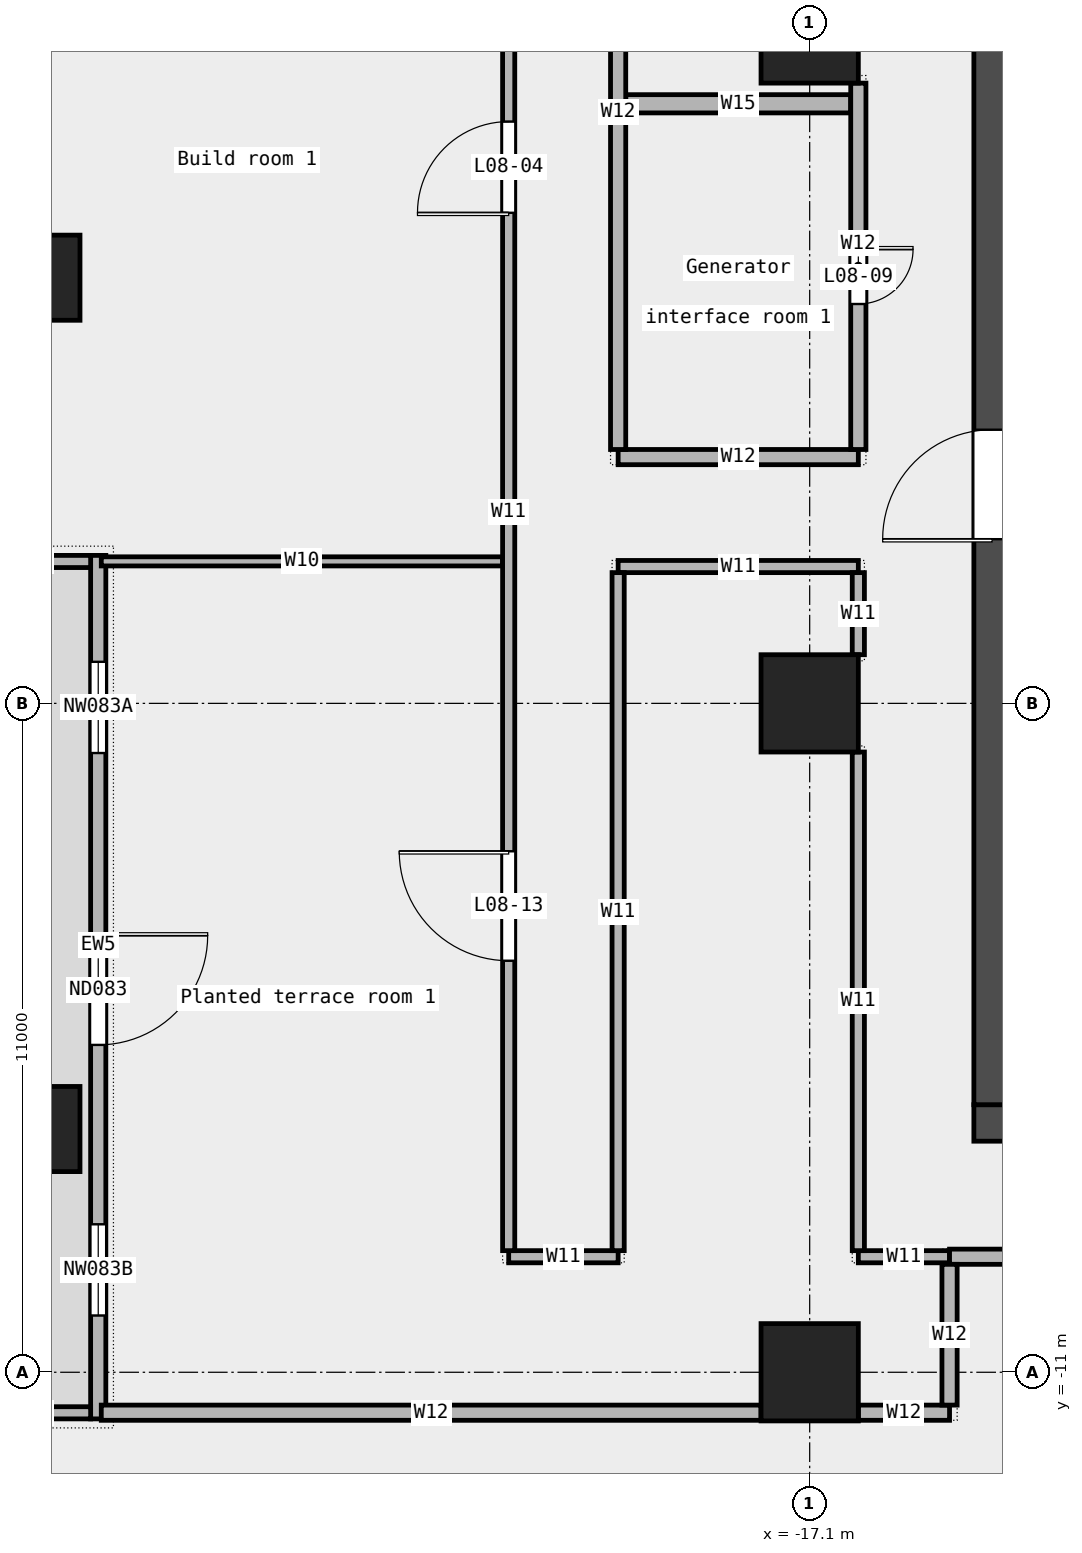
"""IFC4 building model, lengths in metres.
Left out: names, types, materials, properties, quantities, classifications, styles, units other than length and angle.
Written with IfcOpenShell. Run it as: python <this file> out.ifc"""

import sys

from ifc_helpers import new_model, si_unit, direction, frame, frame_2d, origin, origin_2d, place, context, subcontext, project, spatial, rectangle, extrude, element, fill, save


model = new_model("IFC4")
c1 = context("Model", 3, precision=1e-05, world=origin(), true_north=direction((0.0, 1.0)))
c2 = subcontext(c1, "Body", "Model", "MODEL_VIEW")
j1 = project(units=[si_unit("LENGTHUNIT", "METRE"), si_unit("PLANEANGLEUNIT", "RADIAN")], contexts=[c1])
p1 = place(None, origin())
s1 = spatial("IfcSite", under=j1, at=p1, CompositionType="ELEMENT")
p2 = place(p1, origin())
s2 = spatial("IfcBuilding", under=s1, at=p2, CompositionType="ELEMENT")
p3 = place(p2, frame((0.0, 0.0, 45.4)))
s3 = spatial("IfcBuildingStorey", under=s2, at=p3, CompositionType="ELEMENT", Elevation=45.4)
for number, where, z_axis, x_axis in (
    (1, (-29.8, 7.0, 0.0), (0.0, 0.0, 1.0), (1.0, 0.0, 0.0)),
    (2, (-29.8, -7.0, 0.0), (0.0, 0.0, 1.0), (1.0, 0.0, 0.0)),
):
    element("IfcColumn", number, at=place(p3, frame(where, z_axis=z_axis, x_axis=x_axis)), inside=s3, PredefinedType="COLUMN", context=c2, shape_type="SweptSolid", body=[
        extrude(rectangle(XDim=1.4, YDim=1.4, at=origin_2d()), origin(), (0.0, 0.0, 1.0), 4.35),
    ])
for number, where, z_axis, x_axis in (
    (3, (-17.1, -11.0, 0.0), (0.0, 0.0, 1.0), (1.0, 0.0, 0.0)),
    (4, (-17.1, 0.0, 0.0), (0.0, 0.0, 1.0), (1.0, 0.0, 0.0)),
    (5, (-17.1, 11.0, 0.0), (0.0, 0.0, 1.0), (1.0, 0.0, 0.0)),
):
    element("IfcColumn", number, at=place(p3, frame(where, z_axis=z_axis, x_axis=x_axis)), inside=s3, PredefinedType="COLUMN", context=c2, shape_type="SweptSolid", body=[
        extrude(rectangle(XDim=1.6, YDim=1.6, at=origin_2d()), origin(), (0.0, 0.0, 1.0), 4.35),
    ])
p4 = place(p3, frame((-28.8, 2.433, 0.0), z_axis=(0.0, 0.0, 1.0), x_axis=(0.0, -1.0, 0.0)))
e6 = element("IfcWall", 6, at=p4, inside=s3, PredefinedType="STANDARD", context=c2, shape_type="SweptSolid", body=[
    extrude(rectangle(XDim=14.2, YDim=0.25, at=frame_2d((7.1, 0.0))), origin(), (0.0, 0.0, 1.0), 4.35),
])
p5 = place(p4, frame((1.75, 0.0, 0.45)))
e7 = element("IfcOpeningElement", 7, at=p5, cuts=e6, PredefinedType="OPENING", context=c2, shape_type="SweptSolid", body=[
    extrude(rectangle(XDim=1.5, YDim=3.0, at=frame_2d((0.75, 1.5))), frame((0.0, 0.137, 0.0), z_axis=(0.0, -1.0, 0.0), x_axis=(1.0, 0.0, 0.0)), (0.0, 0.0, 1.0), 0.274),
])
p6 = place(p4, frame((6.25, 0.0, 0.0)))
e8 = element("IfcOpeningElement", 8, at=p6, cuts=e6, PredefinedType="OPENING", context=c2, shape_type="SweptSolid", body=[
    extrude(rectangle(XDim=1.8, YDim=2.4, at=frame_2d((0.9, 1.2))), frame((0.0, 0.137, 0.0), z_axis=(0.0, -1.0, 0.0), x_axis=(1.0, 0.0, 0.0)), (0.0, 0.0, 1.0), 0.274),
])
p7 = place(p4, frame((11.0, 0.0, 0.45)))
e9 = element("IfcOpeningElement", 9, at=p7, cuts=e6, PredefinedType="OPENING", context=c2, shape_type="SweptSolid", body=[
    extrude(rectangle(XDim=1.5, YDim=3.0, at=frame_2d((0.75, 1.5))), frame((0.0, 0.137, 0.0), z_axis=(0.0, -1.0, 0.0), x_axis=(1.0, 0.0, 0.0)), (0.0, 0.0, 1.0), 0.274),
])
for number, where, z_axis, x_axis in (
    (10, (-30.8, 2.333, 0.0), (0.0, 0.0, 1.0), (1.0, 0.0, 0.0)),
    (11, (-30.8, -11.667, 0.0), (0.0, 0.0, 1.0), (1.0, 0.0, 0.0)),
):
    element("IfcWall", number, at=place(p3, frame(where, z_axis=z_axis, x_axis=x_axis)), inside=s3, PredefinedType="STANDARD", context=c2, shape_type="SweptSolid", body=[
        extrude(rectangle(XDim=1.875, YDim=0.2, at=frame_2d((0.938, 0.0))), origin(), (0.0, 0.0, 1.0), 4.35),
    ])
p8 = place(p3, frame((-28.75, -11.665, 0.0), z_axis=(0.0, 0.0, 1.0), x_axis=(1.0, 0.0, 0.0)))
e12 = element("IfcWall", 12, at=p8, inside=s3, PredefinedType="PARTITIONING", context=c2, shape_type="SweptSolid", body=[
    extrude(rectangle(XDim=10.85, YDim=0.25, at=frame_2d((5.425, 0.0))), origin(), (0.0, 0.0, 1.0), 4.35),
])
p9 = place(p3, frame((-16.3, -11.665, 0.0), z_axis=(0.0, 0.0, 1.0), x_axis=(1.0, 0.0, 0.0)))
e13 = element("IfcWall", 13, at=p9, inside=s3, PredefinedType="PARTITIONING", context=c2, shape_type="SweptSolid", body=[
    extrude(rectangle(XDim=1.5, YDim=0.25, at=frame_2d((0.75, 0.0))), origin(), (0.0, 0.0, 1.0), 4.35),
])
p10 = place(p3, frame((-22.05, -9.1, 0.0), z_axis=(0.0, 0.0, 1.0), x_axis=(1.0, 0.0, 0.0)))
e14 = element("IfcWall", 14, at=p10, inside=s3, PredefinedType="PARTITIONING", context=c2, shape_type="SweptSolid", body=[
    extrude(rectangle(XDim=1.8, YDim=0.2, at=frame_2d((0.9, 0.0))), origin(), (0.0, 0.0, 1.0), 4.35),
])
p11 = place(p3, frame((-16.3, -9.1, 0.0), z_axis=(0.0, 0.0, 1.0), x_axis=(1.0, 0.0, 0.0)))
e15 = element("IfcWall", 15, at=p11, inside=s3, PredefinedType="PARTITIONING", context=c2, shape_type="SweptSolid", body=[
    extrude(rectangle(XDim=1.5, YDim=0.2, at=frame_2d((0.75, 0.0))), origin(), (0.0, 0.0, 1.0), 4.35),
])
p12 = place(p3, frame((-14.8, -9.1, 0.0), z_axis=(0.0, 0.0, 1.0), x_axis=(1.0, 0.0, 0.0)))
e16 = element("IfcWall", 16, at=p12, inside=s3, PredefinedType="PARTITIONING", context=c2, shape_type="SweptSolid", body=[
    extrude(rectangle(XDim=29.6, YDim=0.25, at=frame_2d((14.8, 0.0))), origin(), (0.0, 0.0, 1.0), 4.35),
])
p13 = place(p12, frame((4.802, 0.0, 0.0)))
e17 = element("IfcOpeningElement", 17, at=p13, cuts=e16, PredefinedType="OPENING", context=c2, shape_type="SweptSolid", body=[
    extrude(rectangle(XDim=1.8, YDim=2.1, at=frame_2d((0.9, 1.05))), frame((0.0, 0.137, 0.0), z_axis=(0.0, -1.0, 0.0), x_axis=(1.0, 0.0, 0.0)), (0.0, 0.0, 1.0), 0.274),
])
p14 = place(p12, frame((21.403, 0.0, 0.0)))
e18 = element("IfcOpeningElement", 18, at=p14, cuts=e16, PredefinedType="OPENING", context=c2, shape_type="SweptSolid", body=[
    extrude(rectangle(XDim=1.8, YDim=2.1, at=frame_2d((0.9, 1.05))), frame((0.0, 0.137, 0.0), z_axis=(0.0, -1.0, 0.0), x_axis=(1.0, 0.0, 0.0)), (0.0, 0.0, 1.0), 0.274),
])
p15 = place(p3, frame((-20.25, 2.25, 0.0), z_axis=(0.0, 0.0, 1.0), x_axis=(1.0, 0.0, 0.0)))
e19 = element("IfcWall", 19, at=p15, inside=s3, PredefinedType="PARTITIONING", context=c2, shape_type="SweptSolid", body=[
    extrude(rectangle(XDim=3.95, YDim=0.2, at=frame_2d((1.975, 0.0))), origin(), (0.0, 0.0, 1.0), 4.35),
])
p16 = place(p3, frame((-28.75, 2.335, 0.0), z_axis=(0.0, 0.0, 1.0), x_axis=(1.0, 0.0, 0.0)))
e20 = element("IfcWall", 20, at=p16, inside=s3, PredefinedType="PARTITIONING", context=c2, shape_type="SweptSolid", body=[
    extrude(rectangle(XDim=6.6, YDim=0.15, at=frame_2d((3.3, 0.0))), origin(), (0.0, 0.0, 1.0), 4.35),
])
p17 = place(p3, frame((-20.25, 4.05, 0.0), z_axis=(0.0, 0.0, 1.0), x_axis=(1.0, 0.0, 0.0)))
e21 = element("IfcWall", 21, at=p17, inside=s3, PredefinedType="PARTITIONING", context=c2, shape_type="SweptSolid", body=[
    extrude(rectangle(XDim=3.95, YDim=0.25, at=frame_2d((1.975, 0.0))), origin(), (0.0, 0.0, 1.0), 4.35),
])
p18 = place(p3, frame((-20.125, 9.86, 0.0), z_axis=(0.0, 0.0, 1.0), x_axis=(1.0, 0.0, 0.0)))
e22 = element("IfcWall", 22, at=p18, inside=s3, PredefinedType="PARTITIONING", context=c2, shape_type="SweptSolid", body=[
    extrude(rectangle(XDim=3.7, YDim=0.3, at=frame_2d((1.85, 0.0))), origin(), (0.0, 0.0, 1.0), 4.35),
])
p19 = place(p3, frame((-22.05, -9.0, 0.0), z_axis=(0.0, 0.0, 1.0), x_axis=(0.0, 1.0, 0.0)))
e23 = element("IfcWall", 23, at=p19, inside=s3, PredefinedType="PARTITIONING", context=c2, shape_type="SweptSolid", body=[
    extrude(rectangle(XDim=24.3, YDim=0.2, at=frame_2d((12.15, 0.0))), origin(), (0.0, 0.0, 1.0), 4.35),
])
p20 = place(p19, frame((17.067, 0.0, 0.0)))
e24 = element("IfcOpeningElement", 24, at=p20, cuts=e23, PredefinedType="OPENING", context=c2, shape_type="SweptSolid", body=[
    extrude(rectangle(XDim=1.5, YDim=2.1, at=frame_2d((0.75, 1.05))), frame((0.0, 0.112, 0.0), z_axis=(0.0, -1.0, 0.0), x_axis=(1.0, 0.0, 0.0)), (0.0, 0.0, 1.0), 0.224),
])
p21 = place(p19, frame((4.768, 0.0, 0.0)))
e25 = element("IfcOpeningElement", 25, at=p21, cuts=e23, PredefinedType="OPENING", context=c2, shape_type="SweptSolid", body=[
    extrude(rectangle(XDim=1.8, YDim=2.1, at=frame_2d((0.9, 1.05))), frame((0.0, 0.112, 0.0), z_axis=(0.0, -1.0, 0.0), x_axis=(1.0, 0.0, 0.0)), (0.0, 0.0, 1.0), 0.224),
])
p22 = place(p3, frame((-20.25, -9.0, 0.0), z_axis=(0.0, 0.0, 1.0), x_axis=(0.0, 1.0, 0.0)))
e26 = element("IfcWall", 26, at=p22, inside=s3, PredefinedType="PARTITIONING", context=c2, shape_type="SweptSolid", body=[
    extrude(rectangle(XDim=11.15, YDim=0.2, at=frame_2d((5.575, 0.0))), origin(), (0.0, 0.0, 1.0), 4.35),
])
p23 = place(p3, frame((-20.25, 4.175, 0.0), z_axis=(0.0, 0.0, 1.0), x_axis=(0.0, 1.0, 0.0)))
e27 = element("IfcWall", 27, at=p23, inside=s3, PredefinedType="PARTITIONING", context=c2, shape_type="SweptSolid", body=[
    extrude(rectangle(XDim=11.1, YDim=0.25, at=frame_2d((5.55, 0.0))), origin(), (0.0, 0.0, 1.0), 4.35),
])
p24 = place(p3, frame((-16.3, -9.0, 0.0), z_axis=(0.0, 0.0, 1.0), x_axis=(0.0, 1.0, 0.0)))
e28 = element("IfcWall", 28, at=p24, inside=s3, PredefinedType="PARTITIONING", context=c2, shape_type="SweptSolid", body=[
    extrude(rectangle(XDim=8.2, YDim=0.2, at=frame_2d((4.1, 0.0))), origin(), (0.0, 0.0, 1.0), 4.35),
])
p25 = place(p3, frame((-16.3, 0.8, 0.0), z_axis=(0.0, 0.0, 1.0), x_axis=(0.0, 1.0, 0.0)))
e29 = element("IfcWall", 29, at=p25, inside=s3, PredefinedType="PARTITIONING", context=c2, shape_type="SweptSolid", body=[
    extrude(rectangle(XDim=1.35, YDim=0.2, at=frame_2d((0.675, 0.0))), origin(), (0.0, 0.0, 1.0), 4.35),
])
p26 = place(p3, frame((-16.3, 4.175, 0.0), z_axis=(0.0, 0.0, 1.0), x_axis=(0.0, 1.0, 0.0)))
e30 = element("IfcWall", 30, at=p26, inside=s3, PredefinedType="PARTITIONING", context=c2, shape_type="SweptSolid", body=[
    extrude(rectangle(XDim=6.025, YDim=0.25, at=frame_2d((3.012, 0.0))), origin(), (0.0, 0.0, 1.0), 4.35),
])
p27 = place(p26, frame((2.393, 0.0, 0.0)))
e31 = element("IfcOpeningElement", 31, at=p27, cuts=e30, PredefinedType="OPENING", context=c2, shape_type="SweptSolid", body=[
    extrude(rectangle(XDim=0.9, YDim=2.1, at=frame_2d((0.45, 1.05))), frame((0.0, 0.137, 0.0), z_axis=(0.0, -1.0, 0.0), x_axis=(1.0, 0.0, 0.0)), (0.0, 0.0, 1.0), 0.274),
])
p28 = place(p3, frame((-14.8, -11.54, 0.0), z_axis=(0.0, 0.0, 1.0), x_axis=(0.0, 1.0, 0.0)))
e32 = element("IfcWall", 32, at=p28, inside=s3, PredefinedType="PARTITIONING", context=c2, shape_type="SweptSolid", body=[
    extrude(rectangle(XDim=2.315, YDim=0.25, at=frame_2d((1.157, 0.0))), origin(), (0.0, 0.0, 1.0), 4.35),
])
p29 = place(p3, frame((-14.4, -6.9, 0.0), z_axis=(0.0, 0.0, 1.0), x_axis=(1.0, 0.0, 0.0)))
e33 = element("IfcWall", 33, at=p29, inside=s3, PredefinedType="SHEAR", context=c2, shape_type="SweptSolid", body=[
    extrude(rectangle(XDim=28.8, YDim=0.6, at=frame_2d((14.4, 0.0))), origin(), (0.0, 0.0, 1.0), 4.5),
])
p30 = place(p29, frame((4.9, 0.0, 0.0)))
e34 = element("IfcOpeningElement", 34, at=p30, cuts=e33, PredefinedType="OPENING", context=c2, shape_type="SweptSolid", body=[
    extrude(rectangle(XDim=1.0, YDim=2.1, at=frame_2d((0.5, 1.05))), frame((0.0, 0.312, 0.0), z_axis=(0.0, -1.0, 0.0), x_axis=(1.0, 0.0, 0.0)), (0.0, 0.0, 1.0), 0.624),
])
p31 = place(p29, frame((8.462, 0.0, 0.0)))
e35 = element("IfcOpeningElement", 35, at=p31, cuts=e33, PredefinedType="OPENING", context=c2, shape_type="SweptSolid", body=[
    extrude(rectangle(XDim=1.0, YDim=2.1, at=frame_2d((0.5, 1.05))), frame((0.0, 0.312, 0.0), z_axis=(0.0, -1.0, 0.0), x_axis=(1.0, 0.0, 0.0)), (0.0, 0.0, 1.0), 0.624),
])
p32 = place(p29, frame((13.425, 0.0, 0.0)))
e36 = element("IfcOpeningElement", 36, at=p32, cuts=e33, PredefinedType="OPENING", context=c2, shape_type="SweptSolid", body=[
    extrude(rectangle(XDim=1.2, YDim=2.1, at=frame_2d((0.6, 1.05))), frame((0.0, 0.312, 0.0), z_axis=(0.0, -1.0, 0.0), x_axis=(1.0, 0.0, 0.0)), (0.0, 0.0, 1.0), 0.624),
])
p33 = place(p29, frame((18.75, 0.0, 0.0)))
e37 = element("IfcOpeningElement", 37, at=p33, cuts=e33, PredefinedType="OPENING", context=c2, shape_type="SweptSolid", body=[
    extrude(rectangle(XDim=1.8, YDim=2.1, at=frame_2d((0.9, 1.05))), frame((0.0, 0.312, 0.0), z_axis=(0.0, -1.0, 0.0), x_axis=(1.0, 0.0, 0.0)), (0.0, 0.0, 1.0), 0.624),
])
p34 = place(p29, frame((23.087, 0.0, 0.0)))
e38 = element("IfcOpeningElement", 38, at=p34, cuts=e33, PredefinedType="OPENING", context=c2, shape_type="SweptSolid", body=[
    extrude(rectangle(XDim=1.0, YDim=2.1, at=frame_2d((0.5, 1.05))), frame((0.0, 0.312, 0.0), z_axis=(0.0, -1.0, 0.0), x_axis=(1.0, 0.0, 0.0)), (0.0, 0.0, 1.0), 0.624),
])
p35 = place(p3, frame((-14.1, -6.6, 0.0), z_axis=(0.0, 0.0, 1.0), x_axis=(0.0, 1.0, 0.0)))
e39 = element("IfcWall", 39, at=p35, inside=s3, PredefinedType="SHEAR", context=c2, shape_type="SweptSolid", body=[
    extrude(rectangle(XDim=19.5, YDim=0.6, at=frame_2d((9.75, 0.0))), origin(), (0.0, 0.0, 1.0), 4.5),
])
p36 = place(p35, frame((9.3, 0.0, 0.0)))
e40 = element("IfcOpeningElement", 40, at=p36, cuts=e39, PredefinedType="OPENING", context=c2, shape_type="SweptSolid", body=[
    extrude(rectangle(XDim=1.8, YDim=2.1, at=frame_2d((0.9, 1.05))), frame((0.0, 0.312, 0.0), z_axis=(0.0, -1.0, 0.0), x_axis=(1.0, 0.0, 0.0)), (0.0, 0.0, 1.0), 0.624),
])
p37 = place(p5, origin())
e41 = element("IfcWindow", 41, at=p37, inside=s3, PartitioningType="SINGLE_PANEL", PredefinedType="WINDOW", context=c2, shape_type="SweptSolid", body=[
    extrude(rectangle(XDim=1.5, YDim=3.0, at=frame_2d((0.75, 1.5))), frame((0.0, 0.03, 0.0), z_axis=(0.0, -1.0, 0.0), x_axis=(1.0, 0.0, 0.0)), (0.0, 0.0, 1.0), 0.06),
])
fill(e7, e41)
p38 = place(p6, origin())
e42 = element("IfcDoor", 42, at=p38, inside=s3, OperationType="DOUBLE_DOOR_SINGLE_SWING", PredefinedType="DOOR", context=c2, shape_type="SweptSolid", body=[
    extrude(rectangle(XDim=1.8, YDim=2.4, at=frame_2d((0.9, 1.2))), frame((0.0, 0.025, 0.0), z_axis=(0.0, -1.0, 0.0), x_axis=(1.0, 0.0, 0.0)), (0.0, 0.0, 1.0), 0.05),
])
fill(e8, e42)
p39 = place(p7, origin())
e43 = element("IfcWindow", 43, at=p39, inside=s3, PartitioningType="SINGLE_PANEL", PredefinedType="WINDOW", context=c2, shape_type="SweptSolid", body=[
    extrude(rectangle(XDim=1.5, YDim=3.0, at=frame_2d((0.75, 1.5))), frame((0.0, 0.03, 0.0), z_axis=(0.0, -1.0, 0.0), x_axis=(1.0, 0.0, 0.0)), (0.0, 0.0, 1.0), 0.06),
])
fill(e9, e43)
p40 = place(p20, origin())
e44 = element("IfcDoor", 44, at=p40, inside=s3, OperationType="DOUBLE_DOOR_SINGLE_SWING", PredefinedType="DOOR", context=c2, shape_type="SweptSolid", body=[
    extrude(rectangle(XDim=1.5, YDim=2.1, at=frame_2d((0.75, 1.05))), frame((0.0, 0.025, 0.0), z_axis=(0.0, -1.0, 0.0), x_axis=(1.0, 0.0, 0.0)), (0.0, 0.0, 1.0), 0.05),
])
fill(e24, e44)
p41 = place(p27, origin())
e45 = element("IfcDoor", 45, at=p41, inside=s3, OperationType="SINGLE_SWING_LEFT", PredefinedType="DOOR", context=c2, shape_type="SweptSolid", body=[
    extrude(rectangle(XDim=0.9, YDim=2.1, at=frame_2d((0.45, 1.05))), frame((0.0, 0.025, 0.0), z_axis=(0.0, -1.0, 0.0), x_axis=(1.0, 0.0, 0.0)), (0.0, 0.0, 1.0), 0.05),
])
fill(e31, e45)
p42 = place(p21, origin())
e46 = element("IfcDoor", 46, at=p42, inside=s3, OperationType="DOUBLE_DOOR_SINGLE_SWING", PredefinedType="DOOR", context=c2, shape_type="SweptSolid", body=[
    extrude(rectangle(XDim=1.8, YDim=2.1, at=frame_2d((0.9, 1.05))), frame((0.0, 0.025, 0.0), z_axis=(0.0, -1.0, 0.0), x_axis=(1.0, 0.0, 0.0)), (0.0, 0.0, 1.0), 0.05),
])
fill(e25, e46)
p43 = place(p36, origin())
e47 = element("IfcDoor", 47, at=p43, inside=s3, OperationType="DOUBLE_DOOR_SINGLE_SWING", PredefinedType="DOOR", context=c2, shape_type="SweptSolid", body=[
    extrude(rectangle(XDim=1.8, YDim=2.1, at=frame_2d((0.9, 1.05))), frame((0.0, 0.025, 0.0), z_axis=(0.0, -1.0, 0.0), x_axis=(1.0, 0.0, 0.0)), (0.0, 0.0, 1.0), 0.05),
])
fill(e40, e47)
save(model, sys.argv[1])
